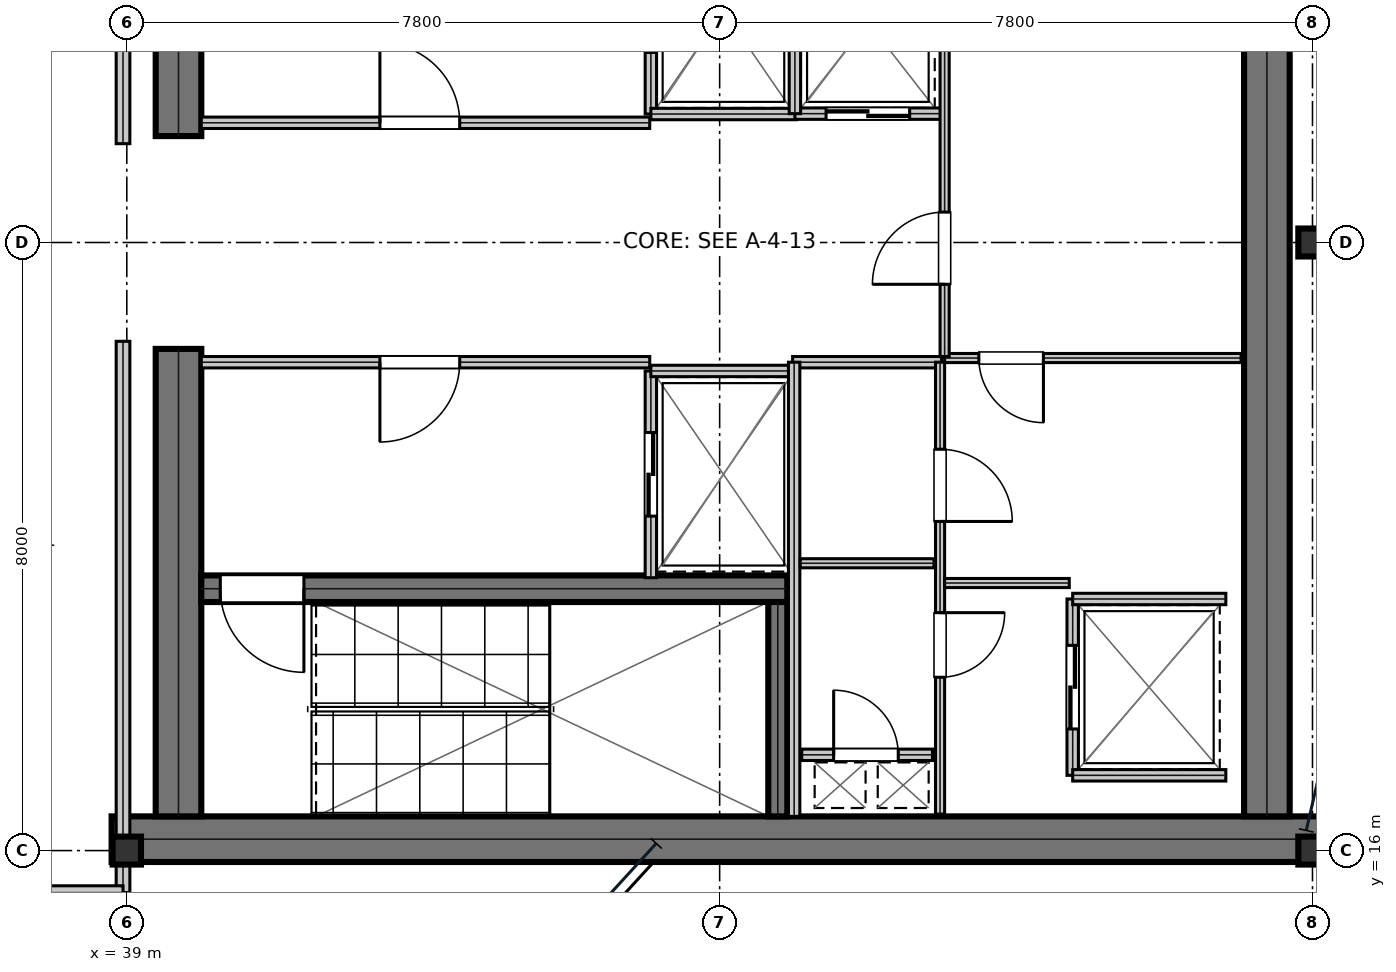
"""IFC4 building model, lengths in metres.
Left out: names, types, materials, properties, quantities, classifications, styles, units other than length and angle.
Written with IfcOpenShell. Run it as: python <this file> out.ifc"""

import sys

from ifc_helpers import new_model, si_unit, direction, frame, frame_2d, origin, origin_2d, place, context, subcontext, project, spatial, rectangle, i_section, extrude, element, fill, save


model = new_model("IFC4")
c1 = context("Model", 3, precision=1e-05, world=origin(), true_north=direction((0.0, 1.0)))
c2 = subcontext(c1, "Body", "Model", "MODEL_VIEW")
j1 = project(units=[si_unit("LENGTHUNIT", "METRE"), si_unit("PLANEANGLEUNIT", "RADIAN")], contexts=[c1])
p1 = place(None, origin())
s1 = spatial("IfcSite", under=j1, at=p1, CompositionType="ELEMENT")
p2 = place(p1, origin())
s2 = spatial("IfcBuilding", under=s1, at=p2, CompositionType="ELEMENT")
p3 = place(p2, frame((0.0, 0.0, 279.0)))
s3 = spatial("IfcBuildingStorey", under=s2, at=p3, CompositionType="ELEMENT", Elevation=279.0)
p4 = place(p3, frame((38.8, 16.15, 0.0), z_axis=(0.0, 0.0, 1.0), x_axis=(1.0, 0.0, 0.0)))
e1 = element("IfcWall", 1, at=p4, inside=s3, PredefinedType="SHEAR", context=c2, shape_type="SweptSolid", body=[
    extrude(rectangle(XDim=16.0, YDim=0.6, at=frame_2d((8.0, 0.0))), origin(), (0.0, 0.0, 1.0), 3.81),
])
for number, where, z_axis, x_axis in (
    (2, (39.68, 16.45, 0.0), (0.0, 0.0, 1.0), (0.0, 1.0, 0.0)),
    (3, (39.68, 25.4, 0.0), (0.0, 0.0, 1.0), (0.0, 1.0, 0.0)),
):
    element("IfcWall", number, at=place(p3, frame(where, z_axis=z_axis, x_axis=x_axis)), inside=s3, PredefinedType="SHEAR", context=c2, shape_type="SweptSolid", body=[
        extrude(rectangle(XDim=6.15, YDim=0.6, at=frame_2d((3.075, 0.0))), origin(), (0.0, 0.0, 1.0), 3.81),
    ])
p5 = place(p3, frame((54.0, 16.45, 0.0), z_axis=(0.0, 0.0, 1.0), x_axis=(0.0, 1.0, 0.0)))
e4 = element("IfcWall", 4, at=p5, inside=s3, PredefinedType="SHEAR", context=c2, shape_type="SweptSolid", body=[
    extrude(rectangle(XDim=15.1, YDim=0.6, at=frame_2d((7.55, 0.0))), origin(), (0.0, 0.0, 1.0), 3.81),
])
p6 = place(p3, frame((39.98, 19.445, 0.0), z_axis=(0.0, 0.0, 1.0), x_axis=(1.0, 0.0, 0.0)))
e5 = element("IfcWall", 5, at=p6, inside=s3, PredefinedType="SHEAR", context=c2, shape_type="SweptSolid", body=[
    extrude(rectangle(XDim=7.71, YDim=0.35, at=frame_2d((3.855, 0.0))), origin(), (0.0, 0.0, 1.0), 3.81),
])
p7 = place(p6, frame((0.25, 0.0, 0.0)))
e6 = element("IfcOpeningElement", 6, at=p7, cuts=e5, PredefinedType="OPENING", context=c2, shape_type="SweptSolid", body=[
    extrude(rectangle(XDim=1.1, YDim=2.15, at=frame_2d((0.55, 1.075))), frame((0.0, 0.185, 0.0), z_axis=(0.0, -1.0, 0.0), x_axis=(1.0, 0.0, 0.0)), (0.0, 0.0, 1.0), 0.37),
])
p8 = place(p3, frame((47.565, 16.45, 0.0), z_axis=(0.0, 0.0, 1.0), x_axis=(0.0, 1.0, 0.0)))
e7 = element("IfcWall", 7, at=p8, inside=s3, PredefinedType="SHEAR", context=c2, shape_type="SweptSolid", body=[
    extrude(rectangle(XDim=2.82, YDim=0.25, at=frame_2d((1.41, 0.0))), origin(), (0.0, 0.0, 1.0), 3.81),
])
for number, where, z_axis, x_axis in (
    (8, (39.0, 16.0, 0.0), (0.0, 0.0, 1.0), (1.0, 0.0, 0.0)),
    (9, (54.6, 16.0, 0.0), (0.0, 0.0, 1.0), (1.0, 0.0, 0.0)),
    (10, (54.6, 24.0, 0.0), (0.0, 0.0, 1.0), (1.0, 0.0, 0.0)),
):
    element("IfcColumn", number, at=place(p3, frame(where, z_axis=z_axis, x_axis=x_axis)), inside=s3, PredefinedType="COLUMN", context=c2, shape_type="SweptSolid", body=[
        extrude(i_section(OverallWidth=0.373, OverallDepth=0.368, WebThickness=0.015, FlangeThickness=0.024, at=origin_2d()), origin(), (0.0, 0.0, 1.0), 4.044),
    ])
p9 = place(p3, frame((39.98, 25.575, 0.0), z_axis=(0.0, 0.0, 1.0), x_axis=(1.0, 0.0, 0.0)))
e11 = element("IfcWall", 11, at=p9, inside=s3, PredefinedType="PARTITIONING", context=c2, shape_type="SweptSolid", body=[
    extrude(rectangle(XDim=5.9, YDim=0.15, at=frame_2d((2.95, 0.0))), origin(), (0.0, 0.0, 1.0), 3.81),
])
p10 = place(p9, frame((2.35, 0.0, 0.0)))
e12 = element("IfcOpeningElement", 12, at=p10, cuts=e11, PredefinedType="OPENING", context=c2, shape_type="SweptSolid", body=[
    extrude(rectangle(XDim=1.05, YDim=2.15, at=frame_2d((0.525, 1.075))), frame((0.0, 0.085, 0.0), z_axis=(0.0, -1.0, 0.0), x_axis=(1.0, 0.0, 0.0)), (0.0, 0.0, 1.0), 0.17),
])
p11 = place(p3, frame((39.98, 22.425, 0.0), z_axis=(0.0, 0.0, 1.0), x_axis=(1.0, 0.0, 0.0)))
e13 = element("IfcWall", 13, at=p11, inside=s3, PredefinedType="PARTITIONING", context=c2, shape_type="SweptSolid", body=[
    extrude(rectangle(XDim=5.9, YDim=0.15, at=frame_2d((2.95, 0.0))), origin(), (0.0, 0.0, 1.0), 3.81),
])
p12 = place(p11, frame((2.35, 0.0, 0.0)))
e14 = element("IfcOpeningElement", 14, at=p12, cuts=e13, PredefinedType="OPENING", context=c2, shape_type="SweptSolid", body=[
    extrude(rectangle(XDim=1.05, YDim=2.15, at=frame_2d((0.525, 1.075))), frame((0.0, 0.085, 0.0), z_axis=(0.0, -1.0, 0.0), x_axis=(1.0, 0.0, 0.0)), (0.0, 0.0, 1.0), 0.17),
])
p13 = place(p3, frame((45.895, 25.69, 0.0), z_axis=(0.0, 0.0, 1.0), x_axis=(0.0, 1.0, 0.0)))
e15 = element("IfcWall", 15, at=p13, inside=s3, PredefinedType="PARTITIONING", context=c2, shape_type="SweptSolid", body=[
    extrude(rectangle(XDim=2.72, YDim=0.15, at=frame_2d((1.36, 0.0))), origin(), (0.0, 0.0, 1.0), 3.81),
])
p14 = place(p13, frame((0.81, 0.0, 0.0)))
e16 = element("IfcOpeningElement", 16, at=p14, cuts=e15, PredefinedType="OPENING", context=c2, shape_type="SweptSolid", body=[
    extrude(rectangle(XDim=1.1, YDim=2.15, at=frame_2d((0.55, 1.075))), frame((0.0, 0.085, 0.0), z_axis=(0.0, -1.0, 0.0), x_axis=(1.0, 0.0, 0.0)), (0.0, 0.0, 1.0), 0.17),
])
p15 = place(p3, frame((45.895, 25.69, 0.0), z_axis=(0.0, 0.0, 1.0), x_axis=(1.0, 0.0, 0.0)))
e17 = element("IfcWall", 17, at=p15, inside=s3, PredefinedType="PARTITIONING", context=c2, shape_type="SweptSolid", body=[
    extrude(rectangle(XDim=1.915, YDim=0.15, at=frame_2d((0.958, 0.0))), origin(), (0.0, 0.0, 1.0), 3.81),
])
p16 = place(p3, frame((45.895, 19.59, 0.0), z_axis=(0.0, 0.0, 1.0), x_axis=(0.0, 1.0, 0.0)))
e18 = element("IfcWall", 18, at=p16, inside=s3, PredefinedType="PARTITIONING", context=c2, shape_type="SweptSolid", body=[
    extrude(rectangle(XDim=2.72, YDim=0.15, at=frame_2d((1.36, 0.0))), origin(), (0.0, 0.0, 1.0), 3.81),
])
p17 = place(p16, frame((0.81, 0.0, 0.0)))
e19 = element("IfcOpeningElement", 19, at=p17, cuts=e18, PredefinedType="OPENING", context=c2, shape_type="SweptSolid", body=[
    extrude(rectangle(XDim=1.1, YDim=2.15, at=frame_2d((0.55, 1.075))), frame((0.0, 0.085, 0.0), z_axis=(0.0, -1.0, 0.0), x_axis=(1.0, 0.0, 0.0)), (0.0, 0.0, 1.0), 0.17),
])
p18 = place(p3, frame((45.895, 22.31, 0.0), z_axis=(0.0, 0.0, 1.0), x_axis=(1.0, 0.0, 0.0)))
e20 = element("IfcWall", 20, at=p18, inside=s3, PredefinedType="PARTITIONING", context=c2, shape_type="SweptSolid", body=[
    extrude(rectangle(XDim=1.915, YDim=0.15, at=frame_2d((0.958, 0.0))), origin(), (0.0, 0.0, 1.0), 3.81),
])
p19 = place(p3, frame((47.79, 25.695, 0.0), z_axis=(0.0, 0.0, 1.0), x_axis=(1.0, 0.0, 0.0)))
e21 = element("IfcWall", 21, at=p19, inside=s3, PredefinedType="PARTITIONING", context=c2, shape_type="SweptSolid", body=[
    extrude(rectangle(XDim=1.92, YDim=0.15, at=frame_2d((0.96, 0.0))), origin(), (0.0, 0.0, 1.0), 3.81),
])
p20 = place(p19, frame((0.41, 0.0, 0.0)))
e22 = element("IfcOpeningElement", 22, at=p20, cuts=e21, PredefinedType="OPENING", context=c2, shape_type="SweptSolid", body=[
    extrude(rectangle(XDim=1.1, YDim=2.15, at=frame_2d((0.55, 1.075))), frame((0.0, 0.085, 0.0), z_axis=(0.0, -1.0, 0.0), x_axis=(1.0, 0.0, 0.0)), (0.0, 0.0, 1.0), 0.17),
])
p21 = place(p3, frame((47.79, 25.695, 0.0), z_axis=(0.0, 0.0, 1.0), x_axis=(0.0, 1.0, 0.0)))
e23 = element("IfcWall", 23, at=p21, inside=s3, PredefinedType="PARTITIONING", context=c2, shape_type="SweptSolid", body=[
    extrude(rectangle(XDim=2.415, YDim=0.15, at=frame_2d((1.208, 0.0))), origin(), (0.0, 0.0, 1.0), 3.81),
])
p22 = place(p3, frame((51.445, 16.99, 0.0), z_axis=(0.0, 0.0, 1.0), x_axis=(0.0, 1.0, 0.0)))
e24 = element("IfcWall", 24, at=p22, inside=s3, PredefinedType="PARTITIONING", context=c2, shape_type="SweptSolid", body=[
    extrude(rectangle(XDim=2.32, YDim=0.15, at=frame_2d((1.16, 0.0))), origin(), (0.0, 0.0, 1.0), 3.81),
])
p23 = place(p22, frame((0.61, 0.0, 0.0)))
e25 = element("IfcOpeningElement", 25, at=p23, cuts=e24, PredefinedType="OPENING", context=c2, shape_type="SweptSolid", body=[
    extrude(rectangle(XDim=1.1, YDim=2.15, at=frame_2d((0.55, 1.075))), frame((0.0, 0.085, 0.0), z_axis=(0.0, -1.0, 0.0), x_axis=(1.0, 0.0, 0.0)), (0.0, 0.0, 1.0), 0.17),
])
for number, where, z_axis, x_axis in (
    (26, (51.445, 16.99, 0.0), (0.0, 0.0, 1.0), (1.0, 0.0, 0.0)),
    (27, (51.445, 19.31, 0.0), (0.0, 0.0, 1.0), (1.0, 0.0, 0.0)),
):
    element("IfcWall", number, at=place(p3, frame(where, z_axis=z_axis, x_axis=x_axis)), inside=s3, PredefinedType="PARTITIONING", context=c2, shape_type="SweptSolid", body=[
        extrude(rectangle(XDim=2.015, YDim=0.15, at=frame_2d((1.007, 0.0))), origin(), (0.0, 0.0, 1.0), 3.81),
    ])
p24 = place(p3, frame((47.88, 17.26, 0.0), z_axis=(0.0, 0.0, 1.0), x_axis=(1.0, 0.0, 0.0)))
e28 = element("IfcWall", 28, at=p24, inside=s3, PredefinedType="PARTITIONING", context=c2, shape_type="SweptSolid", body=[
    extrude(rectangle(XDim=1.72, YDim=0.15, at=frame_2d((0.86, 0.0))), origin(), (0.0, 0.0, 1.0), 3.81),
])
p25 = place(p24, frame((0.42, 0.0, 0.0)))
e29 = element("IfcOpeningElement", 29, at=p25, cuts=e28, PredefinedType="OPENING", context=c2, shape_type="SweptSolid", body=[
    extrude(rectangle(XDim=0.85, YDim=2.15, at=frame_2d((0.425, 1.075))), frame((0.0, 0.085, 0.0), z_axis=(0.0, -1.0, 0.0), x_axis=(1.0, 0.0, 0.0)), (0.0, 0.0, 1.0), 0.17),
])
p26 = place(p3, frame((47.76, 22.425, 0.0), z_axis=(0.0, 0.0, 1.0), x_axis=(1.0, 0.0, 0.0)))
e30 = element("IfcWall", 30, at=p26, inside=s3, PredefinedType="PARTITIONING", context=c2, shape_type="SweptSolid", body=[
    extrude(rectangle(XDim=1.96, YDim=0.15, at=frame_2d((0.98, 0.0))), origin(), (0.0, 0.0, 1.0), 3.81),
])
p27 = place(p3, frame((47.78, 16.45, 0.0), z_axis=(0.0, 0.0, 1.0), x_axis=(0.0, 1.0, 0.0)))
e31 = element("IfcWall", 31, at=p27, inside=s3, PredefinedType="PARTITIONING", context=c2, shape_type="SweptSolid", body=[
    extrude(rectangle(XDim=5.975, YDim=0.15, at=frame_2d((2.988, 0.0))), origin(), (0.0, 0.0, 1.0), 3.81),
])
p28 = place(p3, frame((47.86, 19.78, 0.0), z_axis=(0.0, 0.0, 1.0), x_axis=(1.0, 0.0, 0.0)))
e32 = element("IfcWall", 32, at=p28, inside=s3, PredefinedType="PARTITIONING", context=c2, shape_type="SweptSolid", body=[
    extrude(rectangle(XDim=1.76, YDim=0.12, at=frame_2d((0.88, 0.0))), origin(), (0.0, 0.0, 1.0), 3.81),
])
p29 = place(p3, frame((49.7, 16.48, 0.0), z_axis=(0.0, 0.0, 1.0), x_axis=(0.0, 1.0, 0.0)))
e33 = element("IfcWall", 33, at=p29, inside=s3, PredefinedType="PARTITIONING", context=c2, shape_type="SweptSolid", body=[
    extrude(rectangle(XDim=5.945, YDim=0.12, at=frame_2d((2.973, 0.0))), origin(), (0.0, 0.0, 1.0), 3.81),
])
p30 = place(p29, frame((1.8, 0.0, 0.0)))
e34 = element("IfcOpeningElement", 34, at=p30, cuts=e33, PredefinedType="OPENING", context=c2, shape_type="SweptSolid", body=[
    extrude(rectangle(XDim=0.85, YDim=2.15, at=frame_2d((0.425, 1.075))), frame((0.0, 0.07, 0.0), z_axis=(0.0, -1.0, 0.0), x_axis=(1.0, 0.0, 0.0)), (0.0, 0.0, 1.0), 0.14),
])
p31 = place(p29, frame((3.85, 0.0, 0.0)))
e35 = element("IfcOpeningElement", 35, at=p31, cuts=e33, PredefinedType="OPENING", context=c2, shape_type="SweptSolid", body=[
    extrude(rectangle(XDim=0.95, YDim=2.15, at=frame_2d((0.475, 1.075))), frame((0.0, 0.07, 0.0), z_axis=(0.0, -1.0, 0.0), x_axis=(1.0, 0.0, 0.0)), (0.0, 0.0, 1.0), 0.14),
])
p32 = place(p3, frame((49.76, 22.48, 0.0), z_axis=(0.0, 0.0, 1.0), x_axis=(1.0, 0.0, 0.0)))
e36 = element("IfcWall", 36, at=p32, inside=s3, PredefinedType="PARTITIONING", context=c2, shape_type="SweptSolid", body=[
    extrude(rectangle(XDim=3.9, YDim=0.12, at=frame_2d((1.95, 0.0))), origin(), (0.0, 0.0, 1.0), 3.81),
])
p33 = place(p32, frame((0.45, 0.0, 0.0)))
e37 = element("IfcOpeningElement", 37, at=p33, cuts=e36, PredefinedType="OPENING", context=c2, shape_type="SweptSolid", body=[
    extrude(rectangle(XDim=0.85, YDim=2.15, at=frame_2d((0.425, 1.075))), frame((0.0, 0.07, 0.0), z_axis=(0.0, -1.0, 0.0), x_axis=(1.0, 0.0, 0.0)), (0.0, 0.0, 1.0), 0.14),
])
p34 = place(p3, frame((49.76, 19.52, 0.0), z_axis=(0.0, 0.0, 1.0), x_axis=(1.0, 0.0, 0.0)))
e38 = element("IfcWall", 38, at=p34, inside=s3, PredefinedType="PARTITIONING", context=c2, shape_type="SweptSolid", body=[
    extrude(rectangle(XDim=1.64, YDim=0.12, at=frame_2d((0.82, 0.0))), origin(), (0.0, 0.0, 1.0), 3.81),
])
p35 = place(p3, frame((49.76, 22.5, 0.0), z_axis=(0.0, 0.0, 1.0), x_axis=(0.0, 1.0, 0.0)))
e39 = element("IfcWall", 39, at=p35, inside=s3, PredefinedType="PARTITIONING", context=c2, shape_type="SweptSolid", body=[
    extrude(rectangle(XDim=5.72, YDim=0.12, at=frame_2d((2.86, 0.0))), origin(), (0.0, 0.0, 1.0), 3.81),
])
p36 = place(p35, frame((0.95, 0.0, 0.0)))
e40 = element("IfcOpeningElement", 40, at=p36, cuts=e39, PredefinedType="OPENING", context=c2, shape_type="SweptSolid", body=[
    extrude(rectangle(XDim=0.95, YDim=2.15, at=frame_2d((0.475, 1.075))), frame((0.0, 0.07, 0.0), z_axis=(0.0, -1.0, 0.0), x_axis=(1.0, 0.0, 0.0)), (0.0, 0.0, 1.0), 0.14),
])
p37 = place(p3, frame((38.95, 15.447, 0.0), z_axis=(0.0, 0.0, 1.0), x_axis=(0.0, 1.0, 0.0)))
e41 = element("IfcWall", 41, at=p37, inside=s3, PredefinedType="SOLIDWALL", context=c2, shape_type="SweptSolid", body=[
    extrude(rectangle(XDim=7.253, YDim=0.18, at=frame_2d((3.626, 0.0))), origin(), (0.0, 0.0, 1.0), 3.27),
])
p38 = place(p3, frame((37.05, 15.447, 0.0), z_axis=(0.0, 0.0, 1.0), x_axis=(1.0, 0.0, 0.0)))
e42 = element("IfcWall", 42, at=p38, inside=s3, PredefinedType="SOLIDWALL", context=c2, shape_type="SweptSolid", body=[
    extrude(rectangle(XDim=1.9, YDim=0.18, at=frame_2d((0.95, 0.0))), origin(), (0.0, 0.0, 1.0), 3.27),
])
p39 = place(p3, frame((38.95, 25.3, 0.0), z_axis=(0.0, 0.0, 1.0), x_axis=(0.0, 1.0, 0.0)))
e43 = element("IfcWall", 43, at=p39, inside=s3, PredefinedType="SOLIDWALL", context=c2, shape_type="SweptSolid", body=[
    extrude(rectangle(XDim=7.253, YDim=0.18, at=frame_2d((3.626, 0.0))), origin(), (0.0, 0.0, 1.0), 3.27),
])
p40 = place(p10, origin())
e44 = element("IfcDoor", 44, at=p40, inside=s3, OperationType="SINGLE_SWING_LEFT", PredefinedType="DOOR", context=c2, shape_type="SweptSolid", body=[
    extrude(rectangle(XDim=1.05, YDim=2.15, at=frame_2d((0.525, 1.075))), frame((0.0, 0.025, 0.0), z_axis=(0.0, -1.0, 0.0), x_axis=(1.0, 0.0, 0.0)), (0.0, 0.0, 1.0), 0.05),
])
fill(e12, e44)
p41 = place(p12, frame((1.05, 0.0, 0.0), z_axis=(0.0, 0.0, 1.0), x_axis=(-1.0, 0.0, 0.0)))
e45 = element("IfcDoor", 45, at=p41, inside=s3, OperationType="SINGLE_SWING_RIGHT", PredefinedType="DOOR", context=c2, shape_type="SweptSolid", body=[
    extrude(rectangle(XDim=1.05, YDim=2.15, at=frame_2d((0.525, 1.075))), frame((0.0, 0.025, 0.0), z_axis=(0.0, -1.0, 0.0), x_axis=(1.0, 0.0, 0.0)), (0.0, 0.0, 1.0), 0.05),
])
fill(e14, e45)
p42 = place(p17, frame((1.1, 0.0, 0.0), z_axis=(0.0, 0.0, 1.0), x_axis=(-1.0, 0.0, 0.0)))
e46 = element("IfcDoor", 46, at=p42, inside=s3, OperationType="DOUBLE_DOOR_SLIDING", PredefinedType="DOOR", context=c2, shape_type="SweptSolid", body=[
    extrude(rectangle(XDim=1.1, YDim=2.15, at=frame_2d((0.55, 1.075))), frame((0.0, 0.025, 0.0), z_axis=(0.0, -1.0, 0.0), x_axis=(1.0, 0.0, 0.0)), (0.0, 0.0, 1.0), 0.05),
])
fill(e19, e46)
p43 = place(p20, frame((1.1, 0.0, 0.0), z_axis=(0.0, 0.0, 1.0), x_axis=(-1.0, 0.0, 0.0)))
e47 = element("IfcDoor", 47, at=p43, inside=s3, OperationType="DOUBLE_DOOR_SLIDING", PredefinedType="DOOR", context=c2, shape_type="SweptSolid", body=[
    extrude(rectangle(XDim=1.1, YDim=2.15, at=frame_2d((0.55, 1.075))), frame((0.0, 0.025, 0.0), z_axis=(0.0, -1.0, 0.0), x_axis=(1.0, 0.0, 0.0)), (0.0, 0.0, 1.0), 0.05),
])
fill(e22, e47)
p44 = place(p23, frame((1.1, 0.0, 0.0), z_axis=(0.0, 0.0, 1.0), x_axis=(-1.0, 0.0, 0.0)))
e48 = element("IfcDoor", 48, at=p44, inside=s3, OperationType="DOUBLE_DOOR_SLIDING", PredefinedType="DOOR", context=c2, shape_type="SweptSolid", body=[
    extrude(rectangle(XDim=1.1, YDim=2.15, at=frame_2d((0.55, 1.075))), frame((0.0, 0.025, 0.0), z_axis=(0.0, -1.0, 0.0), x_axis=(1.0, 0.0, 0.0)), (0.0, 0.0, 1.0), 0.05),
])
fill(e25, e48)
p45 = place(p25, origin())
e49 = element("IfcDoor", 49, at=p45, inside=s3, OperationType="SINGLE_SWING_LEFT", PredefinedType="TRAPDOOR", context=c2, shape_type="SweptSolid", body=[
    extrude(rectangle(XDim=0.85, YDim=2.15, at=frame_2d((0.425, 1.075))), frame((0.0, 0.025, 0.0), z_axis=(0.0, -1.0, 0.0), x_axis=(1.0, 0.0, 0.0)), (0.0, 0.0, 1.0), 0.05),
])
fill(e29, e49)
p46 = place(p30, frame((0.85, 0.0, 0.0), z_axis=(0.0, 0.0, 1.0), x_axis=(-1.0, 0.0, 0.0)))
e50 = element("IfcDoor", 50, at=p46, inside=s3, OperationType="SINGLE_SWING_LEFT", PredefinedType="DOOR", context=c2, shape_type="SweptSolid", body=[
    extrude(rectangle(XDim=0.85, YDim=2.15, at=frame_2d((0.425, 1.075))), frame((0.0, 0.025, 0.0), z_axis=(0.0, -1.0, 0.0), x_axis=(1.0, 0.0, 0.0)), (0.0, 0.0, 1.0), 0.05),
])
fill(e34, e50)
p47 = place(p31, frame((0.95, 0.0, 0.0), z_axis=(0.0, 0.0, 1.0), x_axis=(-1.0, 0.0, 0.0)))
e51 = element("IfcDoor", 51, at=p47, inside=s3, OperationType="SINGLE_SWING_RIGHT", PredefinedType="DOOR", context=c2, shape_type="SweptSolid", body=[
    extrude(rectangle(XDim=0.95, YDim=2.15, at=frame_2d((0.475, 1.075))), frame((0.0, 0.025, 0.0), z_axis=(0.0, -1.0, 0.0), x_axis=(1.0, 0.0, 0.0)), (0.0, 0.0, 1.0), 0.05),
])
fill(e35, e51)
p48 = place(p33, frame((0.85, 0.0, 0.0), z_axis=(0.0, 0.0, 1.0), x_axis=(-1.0, 0.0, 0.0)))
e52 = element("IfcDoor", 52, at=p48, inside=s3, OperationType="SINGLE_SWING_LEFT", PredefinedType="DOOR", context=c2, shape_type="SweptSolid", body=[
    extrude(rectangle(XDim=0.85, YDim=2.15, at=frame_2d((0.425, 1.075))), frame((0.0, 0.025, 0.0), z_axis=(0.0, -1.0, 0.0), x_axis=(1.0, 0.0, 0.0)), (0.0, 0.0, 1.0), 0.05),
])
fill(e37, e52)
p49 = place(p36, origin())
e53 = element("IfcDoor", 53, at=p49, inside=s3, OperationType="SINGLE_SWING_LEFT", PredefinedType="DOOR", context=c2, shape_type="SweptSolid", body=[
    extrude(rectangle(XDim=0.95, YDim=2.15, at=frame_2d((0.475, 1.075))), frame((0.0, 0.025, 0.0), z_axis=(0.0, -1.0, 0.0), x_axis=(1.0, 0.0, 0.0)), (0.0, 0.0, 1.0), 0.05),
])
fill(e40, e53)
p50 = place(p7, frame((1.1, 0.0, 0.0), z_axis=(0.0, 0.0, 1.0), x_axis=(-1.0, 0.0, 0.0)))
e54 = element("IfcDoor", 54, at=p50, inside=s3, OperationType="SINGLE_SWING_LEFT", PredefinedType="DOOR", context=c2, shape_type="SweptSolid", body=[
    extrude(rectangle(XDim=1.1, YDim=2.15, at=frame_2d((0.55, 1.075))), frame((0.0, 0.025, 0.0), z_axis=(0.0, -1.0, 0.0), x_axis=(1.0, 0.0, 0.0)), (0.0, 0.0, 1.0), 0.05),
])
fill(e6, e54)
save(model, sys.argv[1])
